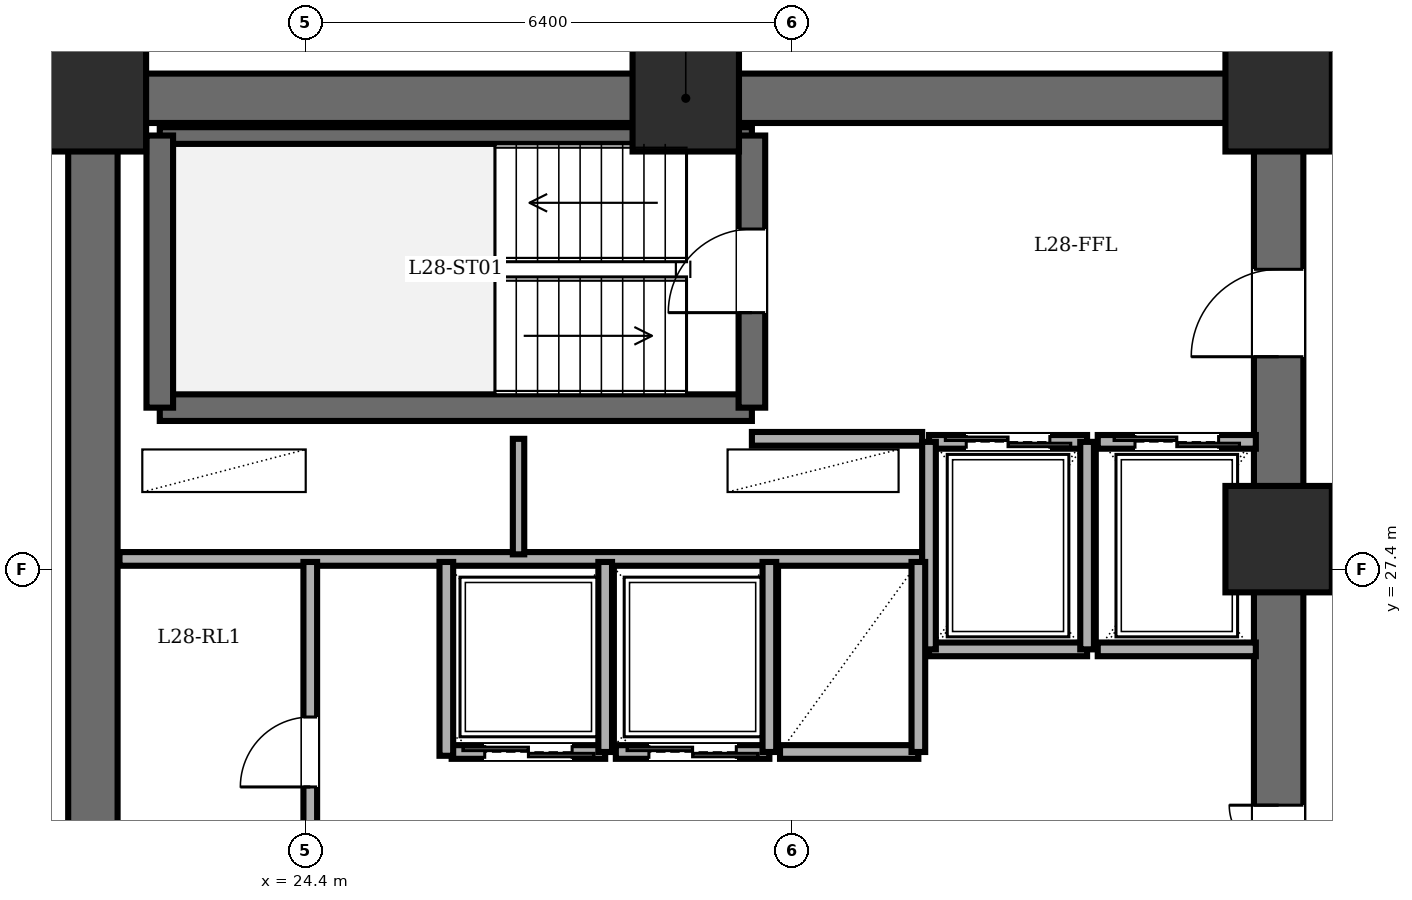
"""IFC4 building model, lengths in metres.
Left out: names, types, materials, properties, quantities, classifications, styles, units other than length and angle.
Written with IfcOpenShell. Run it as: python <this file> out.ifc"""

import sys

from ifc_helpers import new_model, si_unit, direction, frame, frame_2d, origin, origin_2d, place, context, subcontext, project, spatial, rectangle, extrude, element, fill, save


model = new_model("IFC4")
c1 = context("Model", 3, precision=1e-05, world=origin(), true_north=direction((0.0, 1.0)))
c2 = subcontext(c1, "Body", "Model", "MODEL_VIEW")
j1 = project(units=[si_unit("LENGTHUNIT", "METRE"), si_unit("PLANEANGLEUNIT", "RADIAN")], contexts=[c1])
p1 = place(None, origin())
s1 = spatial("IfcSite", under=j1, at=p1, CompositionType="ELEMENT")
p2 = place(p1, origin())
s2 = spatial("IfcBuilding", under=s1, at=p2, CompositionType="ELEMENT")
p3 = place(p2, frame((0.0, 0.0, 107.9)))
s3 = spatial("IfcBuildingStorey", under=s2, at=p3, CompositionType="ELEMENT", Elevation=107.9)
for number, where, z_axis, x_axis in (
    (1, (37.2, 27.8, 0.0), (0.0, 0.0, 1.0), (1.0, 0.0, 0.0)),
    (2, (37.2, 33.6, 0.0), (0.0, 0.0, 1.0), (1.0, 0.0, 0.0)),
    (3, (29.4, 33.6, 0.0), (0.0, 0.0, 1.0), (1.0, 0.0, 0.0)),
    (4, (21.6, 33.6, 0.0), (0.0, 0.0, 1.0), (1.0, 0.0, 0.0)),
):
    element("IfcColumn", number, at=place(p3, frame(where, z_axis=z_axis, x_axis=x_axis)), inside=s3, PredefinedType="COLUMN", context=c2, shape_type="SweptSolid", body=[
        extrude(rectangle(XDim=1.4, YDim=1.4, at=origin_2d()), origin(), (0.0, 0.0, 1.0), 3.6),
    ])
p4 = place(p3, frame((21.6, 14.4, 0.0), z_axis=(0.0, 0.0, 1.0), x_axis=(0.0, 1.0, 0.0)))
e5 = element("IfcWall", 5, at=p4, inside=s3, PredefinedType="SHEAR", context=c2, shape_type="SweptSolid", body=[
    extrude(rectangle(XDim=19.2, YDim=0.65, at=frame_2d((9.6, 0.0))), origin(), (0.0, 0.0, 1.0), 3.4),
])
p5 = place(p3, frame((21.6, 33.6, 0.0), z_axis=(0.0, 0.0, 1.0), x_axis=(1.0, 0.0, 0.0)))
e6 = element("IfcWall", 6, at=p5, inside=s3, PredefinedType="SHEAR", context=c2, shape_type="SweptSolid", body=[
    extrude(rectangle(XDim=15.6, YDim=0.65, at=frame_2d((7.8, 0.0))), origin(), (0.0, 0.0, 1.0), 3.4),
])
p6 = place(p3, frame((37.2, 14.4, 0.0), z_axis=(0.0, 0.0, 1.0), x_axis=(0.0, 1.0, 0.0)))
e7 = element("IfcWall", 7, at=p6, inside=s3, PredefinedType="SHEAR", context=c2, shape_type="SweptSolid", body=[
    extrude(rectangle(XDim=19.2, YDim=0.65, at=frame_2d((9.6, 0.0))), origin(), (0.0, 0.0, 1.0), 3.4),
])
p7 = place(p6, frame((15.8, 0.0, 0.0)))
e8 = element("IfcOpeningElement", 8, at=p7, cuts=e7, PredefinedType="OPENING", context=c2, shape_type="SweptSolid", body=[
    extrude(rectangle(XDim=1.15, YDim=2.15, at=frame_2d((0.575, 1.075))), frame((0.0, 0.335, 0.0), z_axis=(0.0, -1.0, 0.0), x_axis=(1.0, 0.0, 0.0)), (0.0, 0.0, 1.0), 0.67),
])
p8 = place(p6, frame((3.6, 0.0, 0.0)))
e9 = element("IfcOpeningElement", 9, at=p8, cuts=e7, PredefinedType="OPENING", context=c2, shape_type="SweptSolid", body=[
    extrude(rectangle(XDim=1.1, YDim=2.15, at=frame_2d((0.55, 1.075))), frame((0.0, 0.335, 0.0), z_axis=(0.0, -1.0, 0.0), x_axis=(1.0, 0.0, 0.0)), (0.0, 0.0, 1.0), 0.67),
])
p9 = place(p6, frame((8.6, 0.0, 0.0)))
e10 = element("IfcOpeningElement", 10, at=p9, cuts=e7, PredefinedType="OPENING", context=c2, shape_type="SweptSolid", body=[
    extrude(rectangle(XDim=1.3, YDim=2.2, at=frame_2d((0.65, 1.1))), frame((0.0, 0.335, 0.0), z_axis=(0.0, -1.0, 0.0), x_axis=(1.0, 0.0, 0.0)), (0.0, 0.0, 1.0), 0.67),
])
p10 = place(p3, frame((22.48, 29.53, 0.0), z_axis=(0.0, 0.0, 1.0), x_axis=(1.0, 0.0, 0.0)))
e11 = element("IfcWall", 11, at=p10, inside=s3, PredefinedType="SOLIDWALL", context=c2, shape_type="SweptSolid", body=[
    extrude(rectangle(XDim=7.79, YDim=0.35, at=frame_2d((3.895, 0.0))), origin(), (0.0, 0.0, 1.0), 3.4),
])
p11 = place(p3, frame((22.48, 33.11, 0.0), z_axis=(0.0, 0.0, 1.0), x_axis=(1.0, 0.0, 0.0)))
e12 = element("IfcWall", 12, at=p11, inside=s3, PredefinedType="PARTITIONING", context=c2, shape_type="SweptSolid", body=[
    extrude(rectangle(XDim=7.79, YDim=0.22, at=frame_2d((3.895, 0.0))), origin(), (0.0, 0.0, 1.0), 3.4),
])
p12 = place(p3, frame((22.48, 29.53, 0.0), z_axis=(0.0, 0.0, 1.0), x_axis=(0.0, 1.0, 0.0)))
e13 = element("IfcWall", 13, at=p12, inside=s3, PredefinedType="SOLIDWALL", context=c2, shape_type="SweptSolid", body=[
    extrude(rectangle(XDim=3.58, YDim=0.35, at=frame_2d((1.79, 0.0))), origin(), (0.0, 0.0, 1.0), 3.4),
])
p13 = place(p3, frame((30.27, 29.53, 0.0), z_axis=(0.0, 0.0, 1.0), x_axis=(0.0, 1.0, 0.0)))
e14 = element("IfcWall", 14, at=p13, inside=s3, PredefinedType="SOLIDWALL", context=c2, shape_type="SweptSolid", body=[
    extrude(rectangle(XDim=3.58, YDim=0.35, at=frame_2d((1.79, 0.0))), origin(), (0.0, 0.0, 1.0), 3.4),
])
p14 = place(p13, frame((1.25, 0.0, 0.0)))
e15 = element("IfcOpeningElement", 15, at=p14, cuts=e14, PredefinedType="OPENING", context=c2, shape_type="SweptSolid", body=[
    extrude(rectangle(XDim=1.1, YDim=2.15, at=frame_2d((0.55, 1.075))), frame((0.0, 0.185, 0.0), z_axis=(0.0, -1.0, 0.0), x_axis=(1.0, 0.0, 0.0)), (0.0, 0.0, 1.0), 0.37),
])
p15 = place(p3, frame((30.27, 29.12, 0.0), z_axis=(0.0, 0.0, 1.0), x_axis=(1.0, 0.0, 0.0)))
e16 = element("IfcWall", 16, at=p15, inside=s3, PredefinedType="PARTITIONING", context=c2, shape_type="SweptSolid", body=[
    extrude(rectangle(XDim=2.24, YDim=0.18, at=frame_2d((1.12, 0.0))), origin(), (0.0, 0.0, 1.0), 3.4),
])
p16 = place(p3, frame((21.95, 27.54, 0.0), z_axis=(0.0, 0.0, 1.0), x_axis=(1.0, 0.0, 0.0)))
e17 = element("IfcWall", 17, at=p16, inside=s3, PredefinedType="PARTITIONING", context=c2, shape_type="SweptSolid", body=[
    extrude(rectangle(XDim=10.56, YDim=0.18, at=frame_2d((5.28, 0.0))), origin(), (0.0, 0.0, 1.0), 3.4),
])
p17 = place(p3, frame((27.2, 27.6, 0.0), z_axis=(0.0, 0.0, 1.0), x_axis=(0.0, 1.0, 0.0)))
e18 = element("IfcWall", 18, at=p17, inside=s3, PredefinedType="PARTITIONING", context=c2, shape_type="SweptSolid", body=[
    extrude(rectangle(XDim=1.52, YDim=0.15, at=frame_2d((0.76, 0.0))), origin(), (0.0, 0.0, 1.0), 3.4),
])
p18 = place(p3, frame((32.6, 29.08, 0.0), z_axis=(0.0, 0.0, 1.0), x_axis=(1.0, 0.0, 0.0)))
e19 = element("IfcWall", 19, at=p18, inside=s3, PredefinedType="PARTITIONING", context=c2, shape_type="SweptSolid", body=[
    extrude(rectangle(XDim=2.08, YDim=0.18, at=frame_2d((1.04, 0.0))), origin(), (0.0, 0.0, 1.0), 3.4),
])
p19 = place(p18, frame((0.49, 0.0, 0.0)))
e20 = element("IfcOpeningElement", 20, at=p19, cuts=e19, PredefinedType="OPENING", context=c2, shape_type="SweptSolid", body=[
    extrude(rectangle(XDim=1.1, YDim=2.2, at=frame_2d((0.55, 1.1))), frame((0.0, 0.1, 0.0), z_axis=(0.0, -1.0, 0.0), x_axis=(1.0, 0.0, 0.0)), (0.0, 0.0, 1.0), 0.2),
])
p20 = place(p3, frame((34.68, 26.35, 0.0), z_axis=(0.0, 0.0, 1.0), x_axis=(-1.0, 0.0, 0.0)))
e21 = element("IfcWall", 21, at=p20, inside=s3, PredefinedType="PARTITIONING", context=c2, shape_type="SweptSolid", body=[
    extrude(rectangle(XDim=2.08, YDim=0.18, at=frame_2d((1.04, 0.0))), origin(), (0.0, 0.0, 1.0), 3.4),
])
for number, where, z_axis, x_axis in (
    (22, (34.68, 26.35, 0.0), (0.0, 0.0, 1.0), (0.0, 1.0, 0.0)),
    (23, (32.6, 29.08, 0.0), (0.0, 0.0, 1.0), (0.0, -1.0, 0.0)),
):
    element("IfcWall", number, at=place(p3, frame(where, z_axis=z_axis, x_axis=x_axis)), inside=s3, PredefinedType="PARTITIONING", context=c2, shape_type="SweptSolid", body=[
        extrude(rectangle(XDim=2.73, YDim=0.18, at=frame_2d((1.365, 0.0))), origin(), (0.0, 0.0, 1.0), 3.4),
    ])
p21 = place(p3, frame((34.82, 29.08, 0.0), z_axis=(0.0, 0.0, 1.0), x_axis=(1.0, 0.0, 0.0)))
e24 = element("IfcWall", 24, at=p21, inside=s3, PredefinedType="PARTITIONING", context=c2, shape_type="SweptSolid", body=[
    extrude(rectangle(XDim=2.08, YDim=0.18, at=frame_2d((1.04, 0.0))), origin(), (0.0, 0.0, 1.0), 3.4),
])
p22 = place(p21, frame((0.49, 0.0, 0.0)))
e25 = element("IfcOpeningElement", 25, at=p22, cuts=e24, PredefinedType="OPENING", context=c2, shape_type="SweptSolid", body=[
    extrude(rectangle(XDim=1.1, YDim=2.2, at=frame_2d((0.55, 1.1))), frame((0.0, 0.1, 0.0), z_axis=(0.0, -1.0, 0.0), x_axis=(1.0, 0.0, 0.0)), (0.0, 0.0, 1.0), 0.2),
])
p23 = place(p3, frame((36.9, 26.35, 0.0), z_axis=(0.0, 0.0, 1.0), x_axis=(-1.0, 0.0, 0.0)))
e26 = element("IfcWall", 26, at=p23, inside=s3, PredefinedType="PARTITIONING", context=c2, shape_type="SweptSolid", body=[
    extrude(rectangle(XDim=2.08, YDim=0.18, at=frame_2d((1.04, 0.0))), origin(), (0.0, 0.0, 1.0), 3.4),
])
p24 = place(p3, frame((28.34, 25.0, 0.0), z_axis=(0.0, 0.0, 1.0), x_axis=(-1.0, 0.0, 0.0)))
e27 = element("IfcWall", 27, at=p24, inside=s3, PredefinedType="PARTITIONING", context=c2, shape_type="SweptSolid", body=[
    extrude(rectangle(XDim=2.02, YDim=0.18, at=frame_2d((1.01, 0.0))), origin(), (0.0, 0.0, 1.0), 3.4),
])
p25 = place(p24, frame((0.435, 0.0, 0.0)))
e28 = element("IfcOpeningElement", 28, at=p25, cuts=e27, PredefinedType="OPENING", context=c2, shape_type="SweptSolid", body=[
    extrude(rectangle(XDim=1.15, YDim=2.2, at=frame_2d((0.575, 1.1))), frame((0.0, 0.1, 0.0), z_axis=(0.0, -1.0, 0.0), x_axis=(1.0, 0.0, 0.0)), (0.0, 0.0, 1.0), 0.2),
])
p26 = place(p3, frame((28.34, 25.0, 0.0), z_axis=(0.0, 0.0, 1.0), x_axis=(0.0, 1.0, 0.0)))
e29 = element("IfcWall", 29, at=p26, inside=s3, PredefinedType="PARTITIONING", context=c2, shape_type="SweptSolid", body=[
    extrude(rectangle(XDim=2.5, YDim=0.18, at=frame_2d((1.25, 0.0))), origin(), (0.0, 0.0, 1.0), 3.4),
])
p27 = place(p3, frame((30.5, 25.0, 0.0), z_axis=(0.0, 0.0, 1.0), x_axis=(-1.0, 0.0, 0.0)))
e30 = element("IfcWall", 30, at=p27, inside=s3, PredefinedType="PARTITIONING", context=c2, shape_type="SweptSolid", body=[
    extrude(rectangle(XDim=2.02, YDim=0.18, at=frame_2d((1.01, 0.0))), origin(), (0.0, 0.0, 1.0), 3.4),
])
p28 = place(p27, frame((0.435, 0.0, 0.0)))
e31 = element("IfcOpeningElement", 31, at=p28, cuts=e30, PredefinedType="OPENING", context=c2, shape_type="SweptSolid", body=[
    extrude(rectangle(XDim=1.15, YDim=2.2, at=frame_2d((0.575, 1.1))), frame((0.0, 0.1, 0.0), z_axis=(0.0, -1.0, 0.0), x_axis=(1.0, 0.0, 0.0)), (0.0, 0.0, 1.0), 0.2),
])
p29 = place(p3, frame((30.5, 25.0, 0.0), z_axis=(0.0, 0.0, 1.0), x_axis=(0.0, 1.0, 0.0)))
e32 = element("IfcWall", 32, at=p29, inside=s3, PredefinedType="PARTITIONING", context=c2, shape_type="SweptSolid", body=[
    extrude(rectangle(XDim=2.5, YDim=0.18, at=frame_2d((1.25, 0.0))), origin(), (0.0, 0.0, 1.0), 3.4),
])
p30 = place(p3, frame((32.46, 25.0, 0.0), z_axis=(0.0, 0.0, 1.0), x_axis=(-1.0, 0.0, 0.0)))
e33 = element("IfcWall", 33, at=p30, inside=s3, PredefinedType="PARTITIONING", context=c2, shape_type="SweptSolid", body=[
    extrude(rectangle(XDim=1.82, YDim=0.18, at=frame_2d((0.91, 0.0))), origin(), (0.0, 0.0, 1.0), 3.4),
])
p31 = place(p3, frame((32.46, 25.0, 0.0), z_axis=(0.0, 0.0, 1.0), x_axis=(0.0, 1.0, 0.0)))
e34 = element("IfcWall", 34, at=p31, inside=s3, PredefinedType="PARTITIONING", context=c2, shape_type="SweptSolid", body=[
    extrude(rectangle(XDim=2.5, YDim=0.18, at=frame_2d((1.25, 0.0))), origin(), (0.0, 0.0, 1.0), 3.4),
])
p32 = place(p3, frame((24.46, 22.5, 0.0), z_axis=(0.0, 0.0, 1.0), x_axis=(0.0, 1.0, 0.0)))
e35 = element("IfcWall", 35, at=p32, inside=s3, PredefinedType="PARTITIONING", context=c2, shape_type="SweptSolid", body=[
    extrude(rectangle(XDim=5.0, YDim=0.18, at=frame_2d((2.5, 0.0))), origin(), (0.0, 0.0, 1.0), 3.4),
])
p33 = place(p32, frame((2.04, 0.0, 0.0)))
e36 = element("IfcOpeningElement", 36, at=p33, cuts=e35, PredefinedType="OPENING", context=c2, shape_type="SweptSolid", body=[
    extrude(rectangle(XDim=0.92, YDim=2.1, at=frame_2d((0.46, 1.05))), frame((0.0, 0.1, 0.0), z_axis=(0.0, -1.0, 0.0), x_axis=(1.0, 0.0, 0.0)), (0.0, 0.0, 1.0), 0.2),
])
p34 = place(p3, frame((26.25, 24.95, 0.0), z_axis=(0.0, 0.0, 1.0), x_axis=(0.0, 1.0, 0.0)))
e37 = element("IfcWall", 37, at=p34, inside=s3, PredefinedType="PARTITIONING", context=c2, shape_type="SweptSolid", body=[
    extrude(rectangle(XDim=2.55, YDim=0.18, at=frame_2d((1.275, 0.0))), origin(), (0.0, 0.0, 1.0), 3.4),
])
p35 = place(p3, frame((8.8, 33.82, 0.0), z_axis=(0.0, 0.0, 1.0), x_axis=(1.0, 0.0, 0.0)))
e38 = element("IfcWall", 38, at=p35, inside=s3, PredefinedType="PARTITIONING", context=c2, shape_type="SweptSolid", body=[
    extrude(rectangle(XDim=12.68, YDim=0.18, at=frame_2d((6.34, 0.0))), origin(), (0.0, 0.0, 1.0), 3.4),
])
p36 = place(p35, frame((6.18, 0.0, 0.0)))
e39 = element("IfcOpeningElement", 39, at=p36, cuts=e38, PredefinedType="OPENING", context=c2, shape_type="SweptSolid", body=[
    extrude(rectangle(XDim=1.0, YDim=2.15, at=frame_2d((0.5, 1.075))), frame((0.0, 0.1, 0.0), z_axis=(0.0, -1.0, 0.0), x_axis=(1.0, 0.0, 0.0)), (0.0, 0.0, 1.0), 0.2),
])
p37 = place(p14, origin())
e40 = element("IfcDoor", 40, at=p37, inside=s3, OperationType="SINGLE_SWING_LEFT", PredefinedType="DOOR", context=c2, shape_type="SweptSolid", body=[
    extrude(rectangle(XDim=1.1, YDim=2.15, at=frame_2d((0.55, 1.075))), frame((0.0, 0.025, 0.0), z_axis=(0.0, -1.0, 0.0), x_axis=(1.0, 0.0, 0.0)), (0.0, 0.0, 1.0), 0.05),
])
fill(e15, e40)
p38 = place(p7, origin())
e41 = element("IfcDoor", 41, at=p38, inside=s3, OperationType="SINGLE_SWING_LEFT", PredefinedType="DOOR", context=c2, shape_type="SweptSolid", body=[
    extrude(rectangle(XDim=1.15, YDim=2.15, at=frame_2d((0.575, 1.075))), frame((0.0, 0.025, 0.0), z_axis=(0.0, -1.0, 0.0), x_axis=(1.0, 0.0, 0.0)), (0.0, 0.0, 1.0), 0.05),
])
fill(e8, e41)
p39 = place(p19, origin())
e42 = element("IfcDoor", 42, at=p39, inside=s3, OperationType="DOUBLE_DOOR_SLIDING", PredefinedType="DOOR", context=c2, shape_type="SweptSolid", body=[
    extrude(rectangle(XDim=1.1, YDim=2.2, at=frame_2d((0.55, 1.1))), frame((0.0, 0.025, 0.0), z_axis=(0.0, -1.0, 0.0), x_axis=(1.0, 0.0, 0.0)), (0.0, 0.0, 1.0), 0.05),
])
fill(e20, e42)
p40 = place(p22, origin())
e43 = element("IfcDoor", 43, at=p40, inside=s3, OperationType="DOUBLE_DOOR_SLIDING", PredefinedType="DOOR", context=c2, shape_type="SweptSolid", body=[
    extrude(rectangle(XDim=1.1, YDim=2.2, at=frame_2d((0.55, 1.1))), frame((0.0, 0.025, 0.0), z_axis=(0.0, -1.0, 0.0), x_axis=(1.0, 0.0, 0.0)), (0.0, 0.0, 1.0), 0.05),
])
fill(e25, e43)
p41 = place(p25, origin())
e44 = element("IfcDoor", 44, at=p41, inside=s3, OperationType="DOUBLE_DOOR_SLIDING", PredefinedType="DOOR", context=c2, shape_type="SweptSolid", body=[
    extrude(rectangle(XDim=1.15, YDim=2.2, at=frame_2d((0.575, 1.1))), frame((0.0, 0.025, 0.0), z_axis=(0.0, -1.0, 0.0), x_axis=(1.0, 0.0, 0.0)), (0.0, 0.0, 1.0), 0.05),
])
fill(e28, e44)
p42 = place(p28, origin())
e45 = element("IfcDoor", 45, at=p42, inside=s3, OperationType="DOUBLE_DOOR_SLIDING", PredefinedType="DOOR", context=c2, shape_type="SweptSolid", body=[
    extrude(rectangle(XDim=1.15, YDim=2.2, at=frame_2d((0.575, 1.1))), frame((0.0, 0.025, 0.0), z_axis=(0.0, -1.0, 0.0), x_axis=(1.0, 0.0, 0.0)), (0.0, 0.0, 1.0), 0.05),
])
fill(e31, e45)
p43 = place(p33, origin())
e46 = element("IfcDoor", 46, at=p43, inside=s3, OperationType="SINGLE_SWING_LEFT", PredefinedType="DOOR", context=c2, shape_type="SweptSolid", body=[
    extrude(rectangle(XDim=0.92, YDim=2.1, at=frame_2d((0.46, 1.05))), frame((0.0, 0.025, 0.0), z_axis=(0.0, -1.0, 0.0), x_axis=(1.0, 0.0, 0.0)), (0.0, 0.0, 1.0), 0.05),
])
fill(e36, e46)
p44 = place(p9, origin())
e47 = element("IfcDoor", 47, at=p44, inside=s3, OperationType="DOUBLE_DOOR_SINGLE_SWING", PredefinedType="DOOR", context=c2, shape_type="SweptSolid", body=[
    extrude(rectangle(XDim=1.3, YDim=2.2, at=frame_2d((0.65, 1.1))), frame((0.0, 0.025, 0.0), z_axis=(0.0, -1.0, 0.0), x_axis=(1.0, 0.0, 0.0)), (0.0, 0.0, 1.0), 0.05),
])
fill(e10, e47)
save(model, sys.argv[1])
